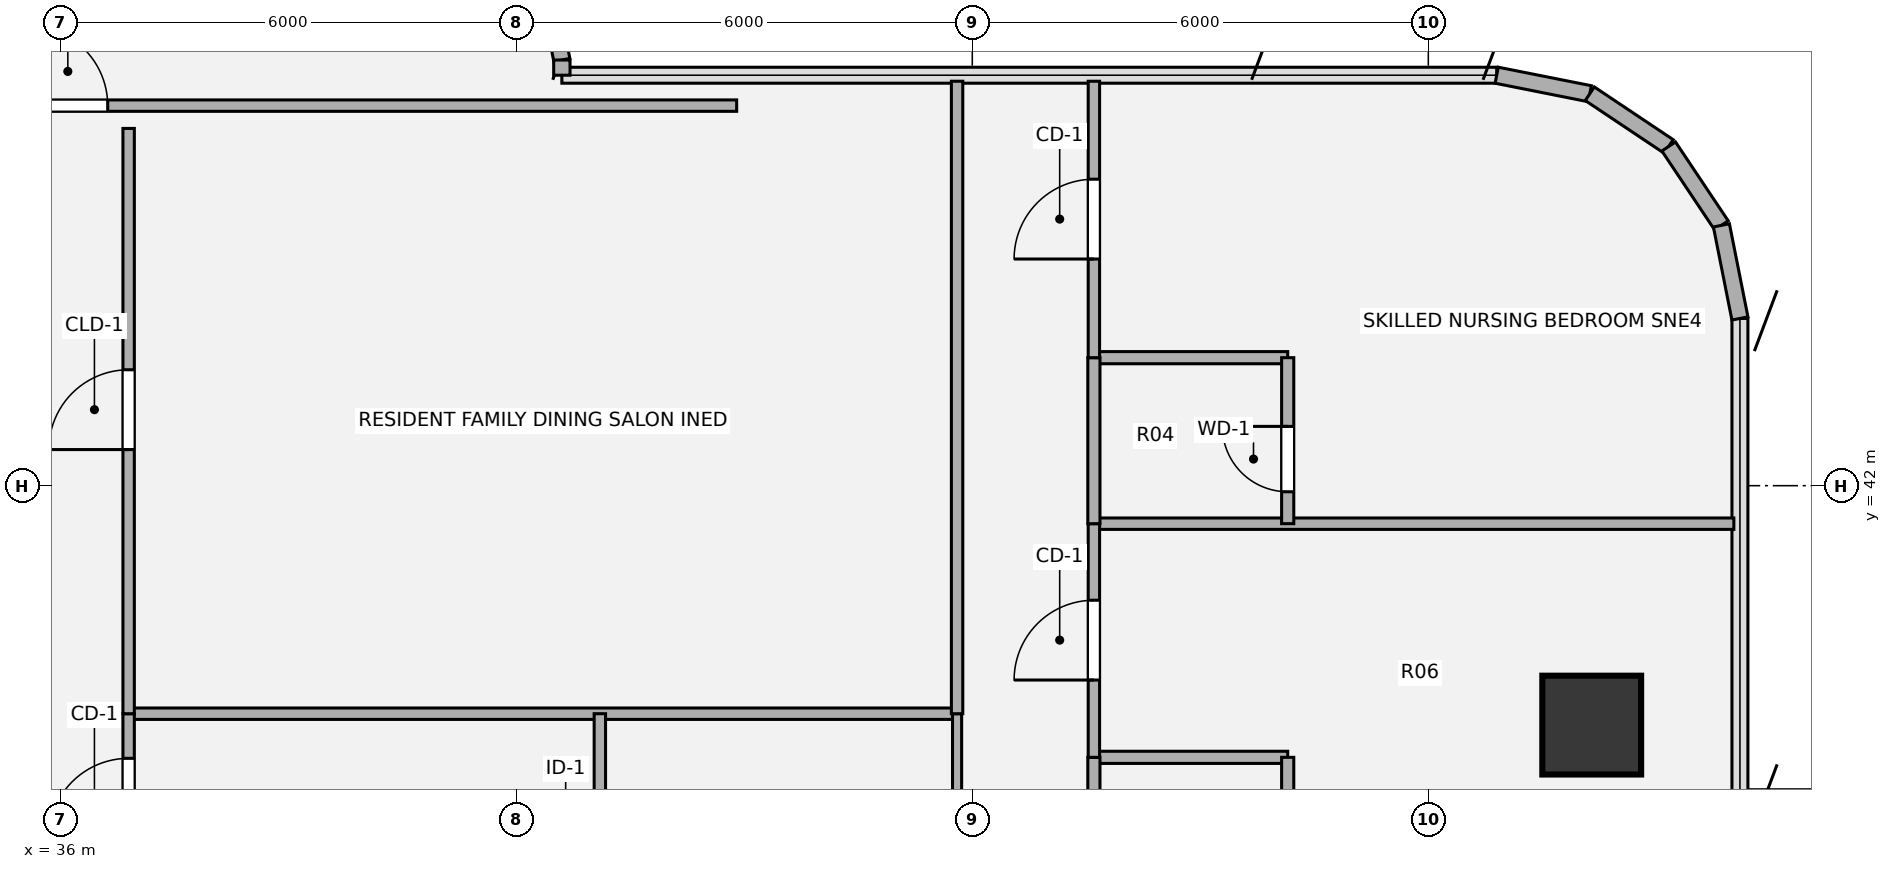
"""IFC4 building model, lengths in metres.
Left out: names, types, materials, properties, quantities, classifications, styles, units other than length and angle.
Written with IfcOpenShell. Run it as: python <this file> out.ifc"""

import sys

from ifc_helpers import new_model, si_unit, direction, frame, frame_2d, origin, origin_2d, place, context, subcontext, project, spatial, rectangle, hollow_circle, extrude, source, transform, mapped, element, fill, save


model = new_model("IFC4")
c1 = context("Model", 3, precision=1e-05, world=origin(), true_north=direction((0.0, 1.0)))
c2 = subcontext(c1, "Body", "Model", "MODEL_VIEW")
j1 = project(units=[si_unit("LENGTHUNIT", "METRE"), si_unit("PLANEANGLEUNIT", "RADIAN")], contexts=[c1])
p1 = place(None, origin())
s1 = spatial("IfcSite", under=j1, at=p1, CompositionType="ELEMENT")
p2 = place(p1, origin())
s2 = spatial("IfcBuilding", under=s1, at=p2, CompositionType="ELEMENT")
p3 = place(p2, frame((0.0, 0.0, 131.4)))
s3 = spatial("IfcBuildingStorey", under=s2, at=p3, CompositionType="ELEMENT", Elevation=131.4)
m1 = source(origin(), c2, "Body", "SweptSolid", [
    extrude(hollow_circle(Radius=0.65, WallThickness=0.045, at=origin_2d()), origin(), (0.0, 0.0, 1.0), 3.78),
])
p4 = place(p3, frame((56.15, 38.85, 0.0), z_axis=(0.0, 0.0, 1.0), x_axis=(1.0, 0.0, 0.0)))
e1 = element("IfcColumn", 1, at=p4, inside=s3, PredefinedType="COLUMN", context=c2, shape_type="MappedRepresentation", body=[
    mapped(m1, transform((0.0, 0.0, 0.0), x_axis=(1.0, 0.0, 0.0), y_axis=(0.0, 1.0, 0.0), z_axis=(0.0, 0.0, 1.0), scale=1.0)),
])
p5 = place(p3, frame((42.387, 48.671, 0.0), z_axis=(0.0, 0.0, 1.0), x_axis=(0.195127417394, -0.980777900945, 0.0)))
e2 = element("IfcWall", 2, at=p5, inside=s3, PredefinedType="SOLIDWALL", context=c2, shape_type="SweptSolid", body=[
    extrude(rectangle(XDim=1.092, YDim=0.215, at=frame_2d((0.546, 0.0))), origin(), (0.0, 0.0, 1.0), 3.53),
])
p6 = place(p3, frame((42.6, 47.6, 0.0), z_axis=(0.0, 0.0, 1.0), x_axis=(0.0, -1.0, 0.0)))
e3 = element("IfcWall", 3, at=p6, inside=s3, PredefinedType="SOLIDWALL", context=c2, shape_type="SweptSolid", body=[
    extrude(rectangle(XDim=0.2, YDim=0.215, at=frame_2d((0.1, 0.0))), origin(), (0.0, 0.0, 1.0), 3.53),
])
for number, where, z_axis, x_axis in (
    (4, (54.9, 47.4, 0.0), (0.0, 0.0, 1.0), (0.981, -0.195, 0.0)),
    (5, (56.125, 47.156, 0.0), (0.0, 0.0, 1.0), (0.831, -0.556, 0.0)),
    (6, (57.163, 46.463, 0.0), (0.0, 0.0, 1.0), (0.556, -0.831, 0.0)),
    (7, (57.856, 45.425, 0.0), (0.0, 0.0, 1.0), (0.195, -0.981, 0.0)),
):
    element("IfcWall", number, at=place(p3, frame(where, z_axis=z_axis, x_axis=x_axis)), inside=s3, PredefinedType="SOLIDWALL", context=c2, shape_type="SweptSolid", body=[
        extrude(rectangle(XDim=1.249, YDim=0.215, at=frame_2d((0.624, 0.0))), origin(), (0.0, 0.0, 1.0), 3.53),
    ])
p7 = place(p3, frame((49.6, 38.426, 0.0), z_axis=(0.0, 0.0, 1.0), x_axis=(1.0, 0.0, 0.0)))
e8 = element("IfcWall", 8, at=p7, inside=s3, PredefinedType="PLUMBINGWALL", context=c2, shape_type="SweptSolid", body=[
    extrude(rectangle(XDim=2.55, YDim=0.16, at=frame_2d((1.275, 0.0))), origin(), (0.0, 0.0, 1.0), 3.055),
])
p8 = place(p3, frame((36.9, 39.0, 0.0), z_axis=(0.0, 0.0, 1.0), x_axis=(1.0, 0.0, 0.0)))
e9 = element("IfcWall", 9, at=p8, inside=s3, PredefinedType="PARTITIONING", context=c2, shape_type="SweptSolid", body=[
    extrude(rectangle(XDim=10.9, YDim=0.15, at=frame_2d((5.45, 0.0))), origin(), (0.0, 0.0, 1.0), 2.903),
])
p9 = place(p3, frame((49.6, 41.5, 0.0), z_axis=(0.0, 0.0, 1.0), x_axis=(1.0, 0.0, 0.0)))
e10 = element("IfcWall", 10, at=p9, inside=s3, PredefinedType="PARTITIONING", context=c2, shape_type="SweptSolid", body=[
    extrude(rectangle(XDim=8.42, YDim=0.15, at=frame_2d((4.21, 0.0))), origin(), (0.0, 0.0, 1.0), 3.5),
])
p10 = place(p3, frame((49.6, 43.684, 0.0), z_axis=(0.0, 0.0, 1.0), x_axis=(1.0, 0.0, 0.0)))
e11 = element("IfcWall", 11, at=p10, inside=s3, PredefinedType="PLUMBINGWALL", context=c2, shape_type="SweptSolid", body=[
    extrude(rectangle(XDim=2.55, YDim=0.16, at=frame_2d((1.275, 0.0))), origin(), (0.0, 0.0, 1.0), 3.5),
])
p11 = place(p3, frame((35.1, 47.0, 0.0), z_axis=(0.0, 0.0, 1.0), x_axis=(1.0, 0.0, 0.0)))
e12 = element("IfcWall", 12, at=p11, inside=s3, PredefinedType="PARTITIONING", context=c2, shape_type="SweptSolid", body=[
    extrude(rectangle(XDim=9.8, YDim=0.15, at=frame_2d((4.9, 0.0))), origin(), (0.0, 0.0, 1.0), 3.308),
])
p12 = place(p11, frame((0.475, 0.0, 0.0)))
e13 = element("IfcOpeningElement", 13, at=p12, cuts=e12, PredefinedType="OPENING", context=c2, shape_type="SweptSolid", body=[
    extrude(rectangle(XDim=1.05, YDim=2.1, at=origin_2d()), frame((0.525, 0.085, 1.05), z_axis=(0.0, -1.0, 0.0), x_axis=(1.0, 0.0, 0.0)), (0.0, 0.0, 1.0), 0.17),
])
p13 = place(p3, frame((36.9, 36.767, 0.0), z_axis=(0.0, 0.0, 1.0), x_axis=(0.0, 1.0, 0.0)))
e14 = element("IfcWall", 14, at=p13, inside=s3, PredefinedType="PARTITIONING", context=c2, shape_type="SweptSolid", body=[
    extrude(rectangle(XDim=2.233, YDim=0.15, at=frame_2d((1.116, 0.0))), origin(), (0.0, 0.0, 1.0), 3.5),
])
p14 = place(p13, frame((0.596, 0.0, 0.0)))
e15 = element("IfcOpeningElement", 15, at=p14, cuts=e14, PredefinedType="OPENING", context=c2, shape_type="SweptSolid", body=[
    extrude(rectangle(XDim=1.05, YDim=2.1, at=origin_2d()), frame((0.525, 0.085, 1.05), z_axis=(0.0, -1.0, 0.0), x_axis=(1.0, 0.0, 0.0)), (0.0, 0.0, 1.0), 0.17),
])
p15 = place(p3, frame((36.9, 39.0, 0.0), z_axis=(0.0, 0.0, 1.0), x_axis=(0.0, 1.0, 0.0)))
e16 = element("IfcWall", 16, at=p15, inside=s3, PredefinedType="PARTITIONING", context=c2, shape_type="SweptSolid", body=[
    extrude(rectangle(XDim=7.7, YDim=0.15, at=frame_2d((3.85, 0.0))), origin(), (0.0, 0.0, 1.0), 3.5),
])
p16 = place(p15, frame((3.475, 0.0, 0.0)))
e17 = element("IfcOpeningElement", 17, at=p16, cuts=e16, PredefinedType="OPENING", context=c2, shape_type="SweptSolid", body=[
    extrude(rectangle(XDim=1.05, YDim=2.1, at=origin_2d()), frame((0.525, 0.085, 1.05), z_axis=(0.0, -1.0, 0.0), x_axis=(1.0, 0.0, 0.0)), (0.0, 0.0, 1.0), 0.17),
])
p17 = place(p3, frame((43.1, 35.15, 0.0), z_axis=(0.0, 0.0, 1.0), x_axis=(0.0, 1.0, 0.0)))
e18 = element("IfcWall", 18, at=p17, inside=s3, PredefinedType="PARTITIONING", context=c2, shape_type="SweptSolid", body=[
    extrude(rectangle(XDim=3.85, YDim=0.15, at=frame_2d((1.925, 0.0))), origin(), (0.0, 0.0, 1.0), 3.5),
])
p18 = place(p17, frame((1.89, 0.0, 0.0)))
e19 = element("IfcOpeningElement", 19, at=p18, cuts=e18, PredefinedType="OPENING", context=c2, shape_type="SweptSolid", body=[
    extrude(rectangle(XDim=0.86, YDim=2.1, at=origin_2d()), frame((0.43, 0.085, 1.05), z_axis=(0.0, -1.0, 0.0), x_axis=(1.0, 0.0, 0.0)), (0.0, 0.0, 1.0), 0.17),
])
p19 = place(p3, frame((47.8, 35.15, 0.0), z_axis=(0.0, 0.0, 1.0), x_axis=(0.0, 1.0, 0.0)))
e20 = element("IfcWall", 20, at=p19, inside=s3, PredefinedType="PARTITIONING", context=c2, shape_type="SweptSolid", body=[
    extrude(rectangle(XDim=3.85, YDim=0.12, at=frame_2d((1.925, 0.0))), origin(), (0.0, 0.0, 1.0), 3.5),
])
p20 = place(p3, frame((47.8, 39.0, 0.0), z_axis=(0.0, 0.0, 1.0), x_axis=(0.0, 1.0, 0.0)))
e21 = element("IfcWall", 21, at=p20, inside=s3, PredefinedType="PARTITIONING", context=c2, shape_type="SweptSolid", body=[
    extrude(rectangle(XDim=8.321, YDim=0.15, at=frame_2d((4.16, 0.0))), origin(), (0.0, 0.0, 1.0), 3.5),
])
p21 = place(p3, frame((49.6, 36.2, 0.0), z_axis=(0.0, 0.0, 1.0), x_axis=(0.0, 1.0, 0.0)))
e22 = element("IfcWall", 22, at=p21, inside=s3, PredefinedType="PLUMBINGWALL", context=c2, shape_type="SweptSolid", body=[
    extrude(rectangle(XDim=2.226, YDim=0.16, at=frame_2d((1.113, 0.0))), origin(), (0.0, 0.0, 1.0), 3.5),
])
p22 = place(p3, frame((49.6, 38.426, 0.0), z_axis=(0.0, 0.0, 1.0), x_axis=(0.0, 1.0, 0.0)))
e23 = element("IfcWall", 23, at=p22, inside=s3, PredefinedType="PARTITIONING", context=c2, shape_type="SweptSolid", body=[
    extrude(rectangle(XDim=3.074, YDim=0.15, at=frame_2d((1.537, 0.0))), origin(), (0.0, 0.0, 1.0), 3.5),
])
p23 = place(p22, frame((1.017, 0.0, 0.0)))
e24 = element("IfcOpeningElement", 24, at=p23, cuts=e23, PredefinedType="OPENING", context=c2, shape_type="SweptSolid", body=[
    extrude(rectangle(XDim=1.05, YDim=2.1, at=origin_2d()), frame((0.525, 0.085, 1.05), z_axis=(0.0, -1.0, 0.0), x_axis=(1.0, 0.0, 0.0)), (0.0, 0.0, 1.0), 0.17),
])
p24 = place(p3, frame((49.6, 41.5, 0.0), z_axis=(0.0, 0.0, 1.0), x_axis=(0.0, 1.0, 0.0)))
e25 = element("IfcWall", 25, at=p24, inside=s3, PredefinedType="PLUMBINGWALL", context=c2, shape_type="SweptSolid", body=[
    extrude(rectangle(XDim=2.184, YDim=0.16, at=frame_2d((1.092, 0.0))), origin(), (0.0, 0.0, 1.0), 3.5),
])
p25 = place(p3, frame((49.6, 43.684, 0.0), z_axis=(0.0, 0.0, 1.0), x_axis=(0.0, 1.0, 0.0)))
e26 = element("IfcWall", 26, at=p25, inside=s3, PredefinedType="PARTITIONING", context=c2, shape_type="SweptSolid", body=[
    extrude(rectangle(XDim=3.637, YDim=0.15, at=frame_2d((1.818, 0.0))), origin(), (0.0, 0.0, 1.0), 3.5),
])
p26 = place(p25, frame((1.298, 0.0, 0.0)))
e27 = element("IfcOpeningElement", 27, at=p26, cuts=e26, PredefinedType="OPENING", context=c2, shape_type="SweptSolid", body=[
    extrude(rectangle(XDim=1.05, YDim=2.1, at=origin_2d()), frame((0.525, 0.085, 1.05), z_axis=(0.0, -1.0, 0.0), x_axis=(1.0, 0.0, 0.0)), (0.0, 0.0, 1.0), 0.17),
])
p27 = place(p3, frame((52.15, 36.2, 0.0), z_axis=(0.0, 0.0, 1.0), x_axis=(0.0, 1.0, 0.0)))
e28 = element("IfcWall", 28, at=p27, inside=s3, PredefinedType="PLUMBINGWALL", context=c2, shape_type="SweptSolid", body=[
    extrude(rectangle(XDim=2.226, YDim=0.16, at=frame_2d((1.113, 0.0))), origin(), (0.0, 0.0, 1.0), 3.5),
])
p28 = place(p27, frame((0.42, 0.0, 0.0)))
e29 = element("IfcOpeningElement", 29, at=p28, cuts=e28, PredefinedType="OPENING", context=c2, shape_type="SweptSolid", body=[
    extrude(rectangle(XDim=0.86, YDim=2.1, at=origin_2d()), frame((0.43, 0.09, 1.05), z_axis=(0.0, -1.0, 0.0), x_axis=(1.0, 0.0, 0.0)), (0.0, 0.0, 1.0), 0.18),
])
p29 = place(p3, frame((52.15, 41.5, 0.0), z_axis=(0.0, 0.0, 1.0), x_axis=(0.0, 1.0, 0.0)))
e30 = element("IfcWall", 30, at=p29, inside=s3, PredefinedType="PLUMBINGWALL", context=c2, shape_type="SweptSolid", body=[
    extrude(rectangle(XDim=2.184, YDim=0.16, at=frame_2d((1.092, 0.0))), origin(), (0.0, 0.0, 1.0), 3.5),
])
p30 = place(p29, frame((0.42, 0.0, 0.0)))
e31 = element("IfcOpeningElement", 31, at=p30, cuts=e30, PredefinedType="OPENING", context=c2, shape_type="SweptSolid", body=[
    extrude(rectangle(XDim=0.86, YDim=2.1, at=origin_2d()), frame((0.43, 0.09, 1.05), z_axis=(0.0, -1.0, 0.0), x_axis=(1.0, 0.0, 0.0)), (0.0, 0.0, 1.0), 0.18),
])
m2 = source(origin(), c2, "Body", "SweptSolid", [
    extrude(rectangle(XDim=1.05, YDim=2.1, at=origin_2d()), frame((0.525, 0.025, 1.05), z_axis=(0.0, -1.0, 0.0), x_axis=(1.0, 0.0, 0.0)), (0.0, 0.0, 1.0), 0.05),
])
p31 = place(p12, origin())
e32 = element("IfcDoor", 32, at=p31, inside=s3, OperationType="SINGLE_SWING_LEFT", PredefinedType="DOOR", context=c2, shape_type="MappedRepresentation", body=[
    mapped(m2, transform((0.0, 0.0, 0.0), x_axis=(1.0, 0.0, 0.0), y_axis=(0.0, 1.0, 0.0), z_axis=(0.0, 0.0, 1.0), scale=1.0)),
])
fill(e13, e32)
m3 = source(origin(), c2, "Body", "SweptSolid", [
    extrude(rectangle(XDim=1.05, YDim=2.1, at=origin_2d()), frame((0.525, 0.025, 1.05), z_axis=(0.0, -1.0, 0.0), x_axis=(1.0, 0.0, 0.0)), (0.0, 0.0, 1.0), 0.05),
])
p32 = place(p14, origin())
e33 = element("IfcDoor", 33, at=p32, inside=s3, OperationType="SINGLE_SWING_LEFT", PredefinedType="DOOR", context=c2, shape_type="MappedRepresentation", body=[
    mapped(m3, transform((0.0, 0.0, 0.0), x_axis=(1.0, 0.0, 0.0), y_axis=(0.0, 1.0, 0.0), z_axis=(0.0, 0.0, 1.0), scale=1.0)),
])
fill(e15, e33)
p33 = place(p16, origin())
e34 = element("IfcDoor", 34, at=p33, inside=s3, OperationType="SINGLE_SWING_LEFT", PredefinedType="DOOR", context=c2, shape_type="MappedRepresentation", body=[
    mapped(m2, transform((0.0, 0.0, 0.0), x_axis=(1.0, 0.0, 0.0), y_axis=(0.0, 1.0, 0.0), z_axis=(0.0, 0.0, 1.0), scale=1.0)),
])
fill(e17, e34)
p34 = place(p23, origin())
e35 = element("IfcDoor", 35, at=p34, inside=s3, OperationType="SINGLE_SWING_LEFT", PredefinedType="DOOR", context=c2, shape_type="MappedRepresentation", body=[
    mapped(m3, transform((0.0, 0.0, 0.0), x_axis=(1.0, 0.0, 0.0), y_axis=(0.0, 1.0, 0.0), z_axis=(0.0, 0.0, 1.0), scale=1.0)),
])
fill(e24, e35)
p35 = place(p26, origin())
e36 = element("IfcDoor", 36, at=p35, inside=s3, OperationType="SINGLE_SWING_LEFT", PredefinedType="DOOR", context=c2, shape_type="MappedRepresentation", body=[
    mapped(m3, transform((0.0, 0.0, 0.0), x_axis=(1.0, 0.0, 0.0), y_axis=(0.0, 1.0, 0.0), z_axis=(0.0, 0.0, 1.0), scale=1.0)),
])
fill(e27, e36)
m4 = source(origin(), c2, "Body", "SweptSolid", [
    extrude(rectangle(XDim=0.86, YDim=2.1, at=origin_2d()), frame((0.43, 0.025, 1.05), z_axis=(0.0, -1.0, 0.0), x_axis=(1.0, 0.0, 0.0)), (0.0, 0.0, 1.0), 0.05),
])
p36 = place(p30, origin())
e37 = element("IfcDoor", 37, at=p36, inside=s3, OperationType="SINGLE_SWING_RIGHT", PredefinedType="DOOR", context=c2, shape_type="MappedRepresentation", body=[
    mapped(m4, transform((0.0, 0.0, 0.0), x_axis=(1.0, 0.0, 0.0), y_axis=(0.0, 1.0, 0.0), z_axis=(0.0, 0.0, 1.0), scale=1.0)),
])
fill(e31, e37)
save(model, sys.argv[1])
